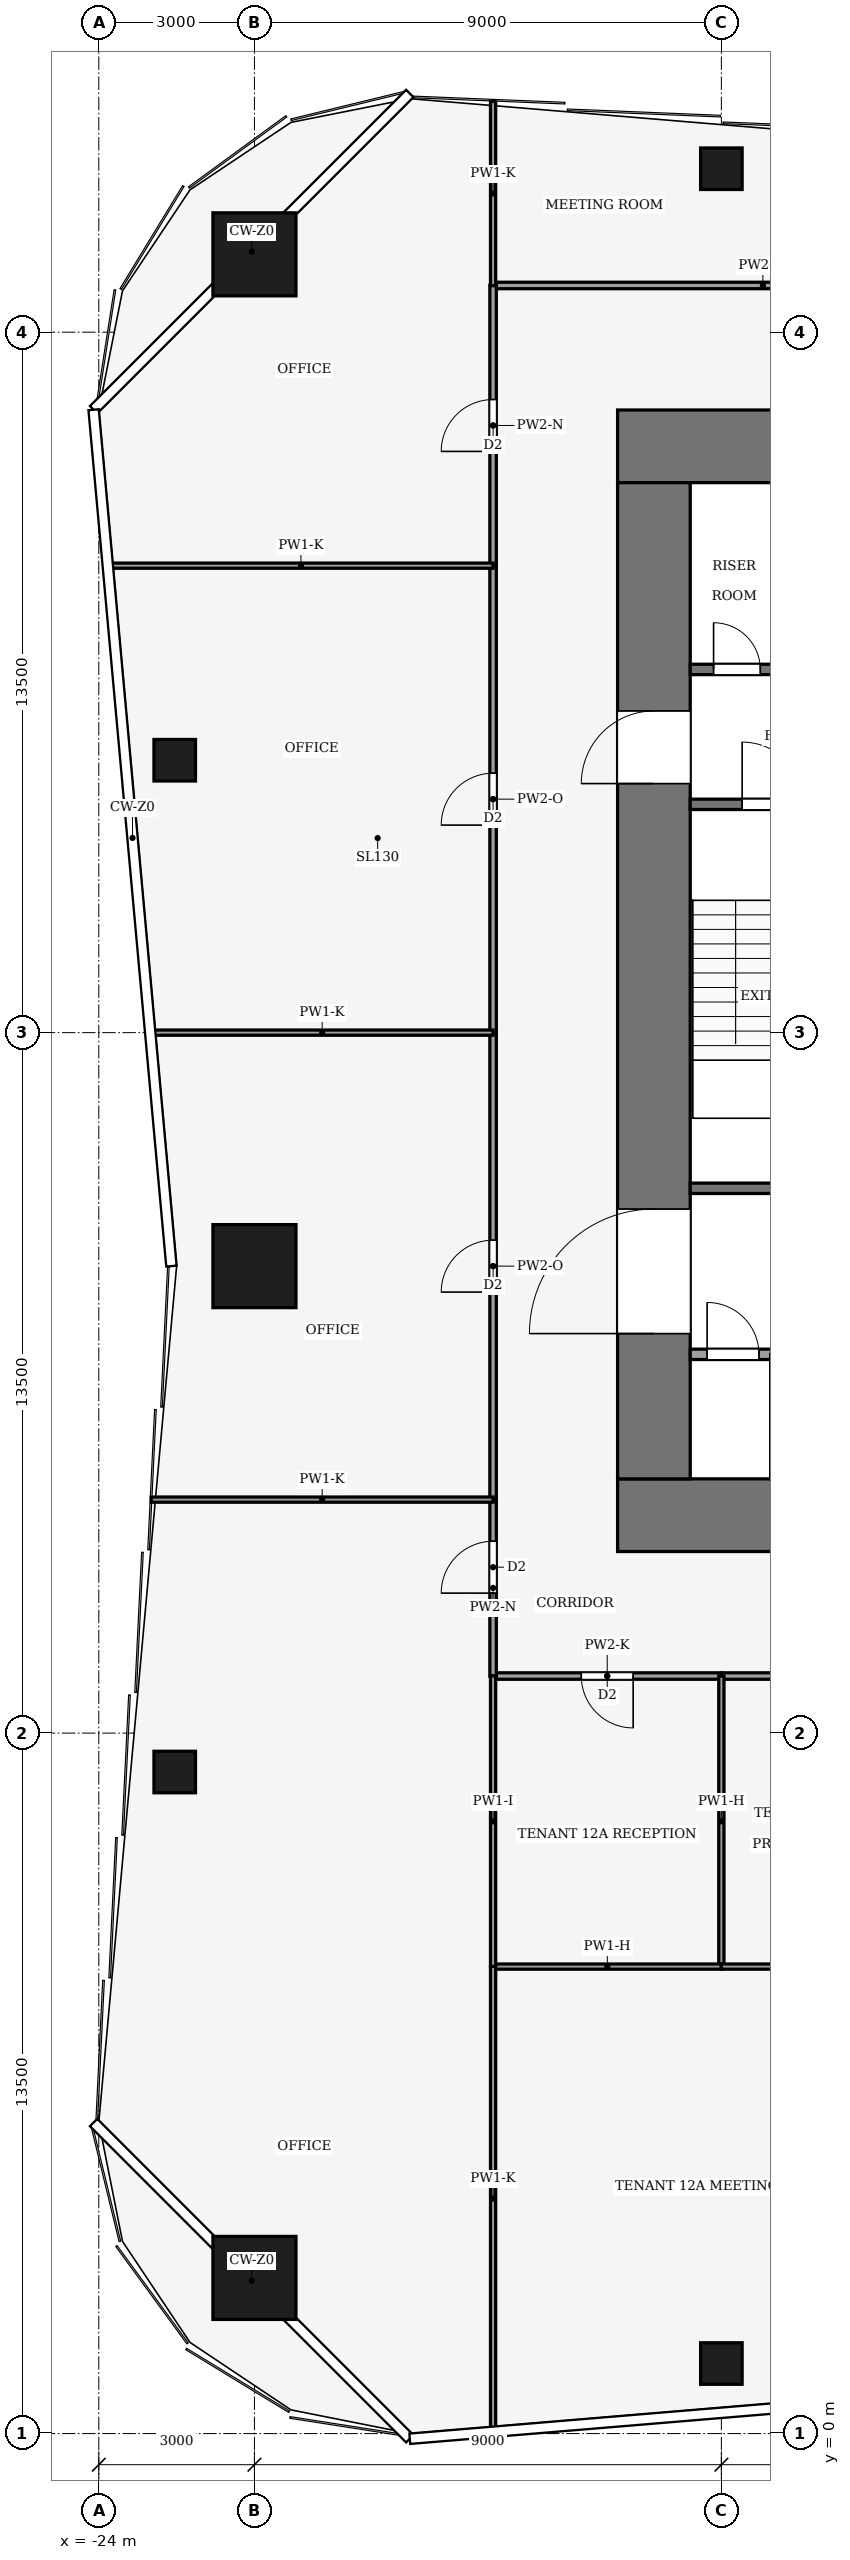
"""IFC4 building model, lengths in metres.
Left out: names, types, materials, properties, quantities, classifications, styles, units other than length and angle.
Written with IfcOpenShell. Run it as: python <this file> out.ifc"""

import sys

from ifc_helpers import new_model, si_unit, direction, frame, frame_2d, origin, origin_2d, place, context, subcontext, project, spatial, rectangle, hollow_rectangle, extrude, element, fill, save


model = new_model("IFC4")
c1 = context("Model", 3, precision=1e-05, world=origin(), true_north=direction((0.0, 1.0)))
c2 = subcontext(c1, "Body", "Model", "MODEL_VIEW")
j1 = project(units=[si_unit("LENGTHUNIT", "METRE"), si_unit("PLANEANGLEUNIT", "RADIAN")], contexts=[c1])
p1 = place(None, origin())
s1 = spatial("IfcSite", under=j1, at=p1, CompositionType="ELEMENT")
p2 = place(p1, origin())
s2 = spatial("IfcBuilding", under=s1, at=p2, CompositionType="ELEMENT")
p3 = place(p2, frame((0.0, 0.0, 54.0)))
s3 = spatial("IfcBuildingStorey", under=s2, at=p3, CompositionType="ELEMENT", Elevation=54.0)
for number, where, z_axis, x_axis in (
    (1, (-14.0, 17.7, -0.13), (0.0, 0.0, 1.0), (1.0, 0.0, 0.0)),
    (2, (-14.0, 38.3, -0.13), (0.0, 0.0, 1.0), (1.0, 0.0, 0.0)),
):
    element("IfcWall", number, at=place(p3, frame(where, z_axis=z_axis, x_axis=x_axis)), inside=s3, PredefinedType="SHEAR", context=c2, shape_type="SweptSolid", body=[
        extrude(rectangle(XDim=28.0, YDim=1.4, at=frame_2d((14.0, 0.0))), origin(), (0.0, 0.0, 1.0), 3.88),
    ])
p4 = place(p3, frame((-13.3, 18.4, -0.13), z_axis=(0.0, 0.0, 1.0), x_axis=(0.0, 1.0, 0.0)))
e3 = element("IfcWall", 3, at=p4, inside=s3, PredefinedType="SHEAR", context=c2, shape_type="SweptSolid", body=[
    extrude(rectangle(XDim=19.2, YDim=1.4, at=frame_2d((9.6, 0.0))), origin(), (0.0, 0.0, 1.0), 3.88),
])
p5 = place(p4, frame((2.8, 0.0, 0.13)))
e4 = element("IfcOpeningElement", 4, at=p5, cuts=e3, PredefinedType="OPENING", context=c2, shape_type="SweptSolid", body=[
    extrude(rectangle(XDim=2.4, YDim=2.4, at=frame_2d((1.2, 1.2))), frame((0.0, 0.71, 0.0), z_axis=(0.0, -1.0, 0.0), x_axis=(1.0, 0.0, 0.0)), (0.0, 0.0, 1.0), 1.42),
])
p6 = place(p4, frame((13.4, 0.0, 0.13)))
e5 = element("IfcOpeningElement", 5, at=p6, cuts=e3, PredefinedType="OPENING", context=c2, shape_type="SweptSolid", body=[
    extrude(rectangle(XDim=1.4, YDim=2.2, at=frame_2d((0.7, 1.1))), frame((0.0, 0.71, 0.0), z_axis=(0.0, -1.0, 0.0), x_axis=(1.0, 0.0, 0.0)), (0.0, 0.0, 1.0), 1.42),
])
for number, where, z_axis, x_axis in (
    (6, (-21.0, 42.0, 0.0), (0.0, 0.0, 1.0), (1.0, 0.0, 0.0)),
    (7, (-21.0, 3.0, 0.0), (0.0, 0.0, 1.0), (1.0, 0.0, 0.0)),
    (8, (-21.0, 22.5, 0.0), (0.0, 0.0, 1.0), (1.0, 0.0, 0.0)),
):
    element("IfcColumn", number, at=place(p3, frame(where, z_axis=z_axis, x_axis=x_axis)), inside=s3, PredefinedType="COLUMN", context=c2, shape_type="SweptSolid", body=[
        extrude(hollow_rectangle(XDim=1.6, YDim=1.6, WallThickness=0.09, at=origin_2d()), origin(), (0.0, 0.0, 1.0), 4.0),
    ])
for number, where, z_axis, x_axis in (
    (9, (-12.0, 43.65, 0.0), (0.0, 0.0, 1.0), (1.0, 0.0, 0.0)),
    (10, (-12.0, 1.35, 0.0), (0.0, 0.0, 1.0), (1.0, 0.0, 0.0)),
    (11, (-22.536, 12.75, 0.0), (0.0, 0.0, 1.0), (1.0, 0.0, 0.0)),
    (12, (-22.536, 32.25, 0.0), (0.0, 0.0, 1.0), (1.0, 0.0, 0.0)),
):
    element("IfcColumn", number, at=place(p3, frame(where, z_axis=z_axis, x_axis=x_axis)), inside=s3, PredefinedType="COLUMN", context=c2, shape_type="SweptSolid", body=[
        extrude(hollow_rectangle(XDim=0.8, YDim=0.8, WallThickness=0.04, at=origin_2d()), origin(), (0.0, 0.0, 1.0), 4.0),
    ])
p7 = place(p3, frame((-12.6, 20.8, 0.0), z_axis=(0.0, 0.0, 1.0), x_axis=(1.0, 0.0, 0.0)))
e13 = element("IfcWall", 13, at=p7, inside=s3, PredefinedType="PARTITIONING", context=c2, shape_type="SweptSolid", body=[
    extrude(rectangle(XDim=6.6, YDim=0.2, at=frame_2d((3.3, 0.0))), origin(), (0.0, 0.0, 1.0), 3.75),
])
p8 = place(p7, frame((0.325, 0.0, 0.0)))
e14 = element("IfcOpeningElement", 14, at=p8, cuts=e13, PredefinedType="OPENING", context=c2, shape_type="SweptSolid", body=[
    extrude(rectangle(XDim=1.0, YDim=2.1, at=frame_2d((0.5, 1.05))), frame((0.0, 0.11, 0.0), z_axis=(0.0, -1.0, 0.0), x_axis=(1.0, 0.0, 0.0)), (0.0, 0.0, 1.0), 0.22),
])
p9 = place(p7, frame((2.8, 0.0, 0.0)))
e15 = element("IfcOpeningElement", 15, at=p9, cuts=e13, PredefinedType="OPENING", context=c2, shape_type="SweptSolid", body=[
    extrude(rectangle(XDim=1.0, YDim=2.1, at=frame_2d((0.5, 1.05))), frame((0.0, 0.11, 0.0), z_axis=(0.0, -1.0, 0.0), x_axis=(1.0, 0.0, 0.0)), (0.0, 0.0, 1.0), 0.22),
])
p10 = place(p7, frame((5.275, 0.0, 0.0)))
e16 = element("IfcOpeningElement", 16, at=p10, cuts=e13, PredefinedType="OPENING", context=c2, shape_type="SweptSolid", body=[
    extrude(rectangle(XDim=1.0, YDim=2.1, at=frame_2d((0.5, 1.05))), frame((0.0, 0.11, 0.0), z_axis=(0.0, -1.0, 0.0), x_axis=(1.0, 0.0, 0.0)), (0.0, 0.0, 1.0), 0.22),
])
p11 = place(p3, frame((-12.6, 24.0, 0.0), z_axis=(0.0, 0.0, 1.0), x_axis=(1.0, 0.0, 0.0)))
e17 = element("IfcWall", 17, at=p11, inside=s3, PredefinedType="PARTITIONING", context=c2, shape_type="SweptSolid", body=[
    extrude(rectangle(XDim=6.6, YDim=0.2, at=frame_2d((3.3, 0.0))), origin(), (0.0, 0.0, 1.0), 3.75),
])
p12 = place(p11, frame((4.03, 0.0, 0.0)))
e18 = element("IfcOpeningElement", 18, at=p12, cuts=e17, PredefinedType="OPENING", context=c2, shape_type="SweptSolid", body=[
    extrude(rectangle(XDim=0.8, YDim=2.1, at=frame_2d((0.4, 1.05))), frame((0.0, 0.11, 0.0), z_axis=(0.0, -1.0, 0.0), x_axis=(1.0, 0.0, 0.0)), (0.0, 0.0, 1.0), 0.22),
])
p13 = place(p11, frame((5.33, 0.0, 0.0)))
e19 = element("IfcOpeningElement", 19, at=p13, cuts=e17, PredefinedType="OPENING", context=c2, shape_type="SweptSolid", body=[
    extrude(rectangle(XDim=1.0, YDim=2.1, at=frame_2d((0.5, 1.05))), frame((0.0, 0.11, 0.0), z_axis=(0.0, -1.0, 0.0), x_axis=(1.0, 0.0, 0.0)), (0.0, 0.0, 1.0), 0.22),
])
p14 = place(p3, frame((-12.6, 31.4, 0.0), z_axis=(0.0, 0.0, 1.0), x_axis=(1.0, 0.0, 0.0)))
e20 = element("IfcWall", 20, at=p14, inside=s3, PredefinedType="PARTITIONING", context=c2, shape_type="SweptSolid", body=[
    extrude(rectangle(XDim=6.6, YDim=0.2, at=frame_2d((3.3, 0.0))), origin(), (0.0, 0.0, 1.0), 3.75),
])
p15 = place(p14, frame((1.0, 0.0, 0.0)))
e21 = element("IfcOpeningElement", 21, at=p15, cuts=e20, PredefinedType="OPENING", context=c2, shape_type="SweptSolid", body=[
    extrude(rectangle(XDim=1.2, YDim=2.2, at=frame_2d((0.6, 1.1))), frame((0.0, 0.11, 0.0), z_axis=(0.0, -1.0, 0.0), x_axis=(1.0, 0.0, 0.0)), (0.0, 0.0, 1.0), 0.22),
])
p16 = place(p3, frame((-12.6, 34.0, 0.0), z_axis=(0.0, 0.0, 1.0), x_axis=(1.0, 0.0, 0.0)))
e22 = element("IfcWall", 22, at=p16, inside=s3, PredefinedType="PARTITIONING", context=c2, shape_type="SweptSolid", body=[
    extrude(rectangle(XDim=6.6, YDim=0.2, at=frame_2d((3.3, 0.0))), origin(), (0.0, 0.0, 1.0), 3.75),
])
p17 = place(p16, frame((4.7, 0.0, 0.0)))
e23 = element("IfcOpeningElement", 23, at=p17, cuts=e22, PredefinedType="OPENING", context=c2, shape_type="SweptSolid", body=[
    extrude(rectangle(XDim=1.4, YDim=2.2, at=frame_2d((0.7, 1.1))), frame((0.0, 0.11, 0.0), z_axis=(0.0, -1.0, 0.0), x_axis=(1.0, 0.0, 0.0)), (0.0, 0.0, 1.0), 0.22),
])
p18 = place(p16, frame((2.3, 0.0, 0.0)))
e24 = element("IfcOpeningElement", 24, at=p18, cuts=e22, PredefinedType="OPENING", context=c2, shape_type="SweptSolid", body=[
    extrude(rectangle(XDim=1.4, YDim=2.2, at=frame_2d((0.7, 1.1))), frame((0.0, 0.11, 0.0), z_axis=(0.0, -1.0, 0.0), x_axis=(1.0, 0.0, 0.0)), (0.0, 0.0, 1.0), 0.22),
])
p19 = place(p16, frame((0.45, 0.0, 0.0)))
e25 = element("IfcOpeningElement", 25, at=p19, cuts=e22, PredefinedType="OPENING", context=c2, shape_type="SweptSolid", body=[
    extrude(rectangle(XDim=0.9, YDim=2.1, at=frame_2d((0.45, 1.05))), frame((0.0, 0.11, 0.0), z_axis=(0.0, -1.0, 0.0), x_axis=(1.0, 0.0, 0.0)), (0.0, 0.0, 1.0), 0.22),
])
p20 = place(p3, frame((-12.0, 14.6, 0.0), z_axis=(0.0, 0.0, 1.0), x_axis=(-1.0, 0.0, 0.0)))
e26 = element("IfcWall", 26, at=p20, inside=s3, PredefinedType="PARTITIONING", context=c2, shape_type="SweptSolid", body=[
    extrude(rectangle(XDim=4.4, YDim=0.125, at=frame_2d((2.2, 0.0))), origin(), (0.0, 0.0, 1.0), 3.17),
])
p21 = place(p20, frame((1.7, 0.0, 0.0)))
e27 = element("IfcOpeningElement", 27, at=p21, cuts=e26, PredefinedType="OPENING", context=c2, shape_type="SweptSolid", body=[
    extrude(rectangle(XDim=1.0, YDim=2.1, at=frame_2d((0.5, 1.05))), frame((0.0, 0.073, 0.0), z_axis=(0.0, -1.0, 0.0), x_axis=(1.0, 0.0, 0.0)), (0.0, 0.0, 1.0), 0.145),
])
p22 = place(p3, frame((-12.0, 14.6, 0.0), z_axis=(0.0, 0.0, 1.0), x_axis=(1.0, 0.0, 0.0)))
e28 = element("IfcWall", 28, at=p22, inside=s3, PredefinedType="PARTITIONING", context=c2, shape_type="SweptSolid", body=[
    extrude(rectangle(XDim=3.0, YDim=0.125, at=frame_2d((1.5, 0.0))), origin(), (0.0, 0.0, 1.0), 3.17),
])
p23 = place(p3, frame((-16.4, 41.4, 0.0), z_axis=(0.0, 0.0, 1.0), x_axis=(1.0, 0.0, 0.0)))
e29 = element("IfcWall", 29, at=p23, inside=s3, PredefinedType="PARTITIONING", context=c2, shape_type="SweptSolid", body=[
    extrude(rectangle(XDim=10.4, YDim=0.125, at=frame_2d((5.2, 0.0))), origin(), (0.0, 0.0, 1.0), 3.42),
])
p24 = place(p23, frame((7.5, 0.0, 0.0)))
e30 = element("IfcOpeningElement", 30, at=p24, cuts=e29, PredefinedType="OPENING", context=c2, shape_type="SweptSolid", body=[
    extrude(rectangle(XDim=1.0, YDim=2.1, at=frame_2d((0.5, 1.05))), frame((0.0, 0.073, 0.0), z_axis=(0.0, -1.0, 0.0), x_axis=(1.0, 0.0, 0.0)), (0.0, 0.0, 1.0), 0.145),
])
p25 = place(p3, frame((-16.4, 14.596, 0.0), z_axis=(0.0, 0.0, 1.0), x_axis=(0.0, 1.0, 0.0)))
e31 = element("IfcWall", 31, at=p25, inside=s3, PredefinedType="PARTITIONING", context=c2, shape_type="SweptSolid", body=[
    extrude(rectangle(XDim=3.404, YDim=0.125, at=frame_2d((1.702, 0.0))), origin(), (0.0, 0.0, 1.0), 3.02),
])
p26 = place(p25, frame((1.602, 0.0, 0.0)))
e32 = element("IfcOpeningElement", 32, at=p26, cuts=e31, PredefinedType="OPENING", context=c2, shape_type="SweptSolid", body=[
    extrude(rectangle(XDim=1.0, YDim=2.1, at=frame_2d((0.5, 1.05))), frame((0.0, 0.073, 0.0), z_axis=(0.0, -1.0, 0.0), x_axis=(1.0, 0.0, 0.0)), (0.0, 0.0, 1.0), 0.145),
])
p27 = place(p3, frame((-16.4, 18.0, 0.0), z_axis=(0.0, 0.0, 1.0), x_axis=(0.0, 1.0, 0.0)))
e33 = element("IfcWall", 33, at=p27, inside=s3, PredefinedType="PARTITIONING", context=c2, shape_type="SweptSolid", body=[
    extrude(rectangle(XDim=9.0, YDim=0.125, at=frame_2d((4.5, 0.0))), origin(), (0.0, 0.0, 1.0), 3.36),
])
p28 = place(p27, frame((4.0, 0.0, 0.0)))
e34 = element("IfcOpeningElement", 34, at=p28, cuts=e33, PredefinedType="OPENING", context=c2, shape_type="SweptSolid", body=[
    extrude(rectangle(XDim=1.0, YDim=2.1, at=frame_2d((0.5, 1.05))), frame((0.0, 0.073, 0.0), z_axis=(0.0, -1.0, 0.0), x_axis=(1.0, 0.0, 0.0)), (0.0, 0.0, 1.0), 0.145),
])
p29 = place(p3, frame((-16.4, 27.0, 0.0), z_axis=(0.0, 0.0, 1.0), x_axis=(0.0, 1.0, 0.0)))
e35 = element("IfcWall", 35, at=p29, inside=s3, PredefinedType="PARTITIONING", context=c2, shape_type="SweptSolid", body=[
    extrude(rectangle(XDim=9.0, YDim=0.125, at=frame_2d((4.5, 0.0))), origin(), (0.0, 0.0, 1.0), 3.36),
])
p30 = place(p29, frame((4.0, 0.0, 0.0)))
e36 = element("IfcOpeningElement", 36, at=p30, cuts=e35, PredefinedType="OPENING", context=c2, shape_type="SweptSolid", body=[
    extrude(rectangle(XDim=1.0, YDim=2.1, at=frame_2d((0.5, 1.05))), frame((0.0, 0.073, 0.0), z_axis=(0.0, -1.0, 0.0), x_axis=(1.0, 0.0, 0.0)), (0.0, 0.0, 1.0), 0.145),
])
p31 = place(p3, frame((-16.4, 36.0, 0.0), z_axis=(0.0, 0.0, 1.0), x_axis=(0.0, 1.0, 0.0)))
e37 = element("IfcWall", 37, at=p31, inside=s3, PredefinedType="PARTITIONING", context=c2, shape_type="SweptSolid", body=[
    extrude(rectangle(XDim=5.404, YDim=0.125, at=frame_2d((2.702, 0.0))), origin(), (0.0, 0.0, 1.0), 3.02),
])
p32 = place(p31, frame((2.202, 0.0, 0.0)))
e38 = element("IfcOpeningElement", 38, at=p32, cuts=e37, PredefinedType="OPENING", context=c2, shape_type="SweptSolid", body=[
    extrude(rectangle(XDim=1.0, YDim=2.1, at=frame_2d((0.5, 1.05))), frame((0.0, 0.073, 0.0), z_axis=(0.0, -1.0, 0.0), x_axis=(1.0, 0.0, 0.0)), (0.0, 0.0, 1.0), 0.145),
])
p33 = place(p3, frame((-12.0, 9.0, 0.0), z_axis=(0.0, 0.0, 1.0), x_axis=(0.0, 1.0, 0.0)))
e39 = element("IfcWall", 39, at=p33, inside=s3, PredefinedType="PARTITIONING", context=c2, shape_type="SweptSolid", body=[
    extrude(rectangle(XDim=5.6, YDim=0.1, at=frame_2d((2.8, 0.0))), origin(), (0.0, 0.0, 1.0), 3.17),
])
p34 = place(p3, frame((-16.4, 9.0, 0.0), z_axis=(0.0, 0.0, 1.0), x_axis=(1.0, 0.0, 0.0)))
e40 = element("IfcWall", 40, at=p34, inside=s3, PredefinedType="PARTITIONING", context=c2, shape_type="SweptSolid", body=[
    extrude(rectangle(XDim=4.404, YDim=0.1, at=frame_2d((2.202, 0.0))), origin(), (0.0, 0.0, 1.0), 3.17),
])
p35 = place(p3, frame((-16.4, 14.604, 0.0), z_axis=(0.0, 0.0, 1.0), x_axis=(0.0, -1.0, 0.0)))
e41 = element("IfcWall", 41, at=p35, inside=s3, PredefinedType="PARTITIONING", context=c2, shape_type="SweptSolid", body=[
    extrude(rectangle(XDim=5.608, YDim=0.1, at=frame_2d((2.804, 0.0))), origin(), (0.0, 0.0, 1.0), 3.75),
])
p36 = place(p3, frame((-12.004, 9.0, 0.0), z_axis=(0.0, 0.0, 1.0), x_axis=(1.0, 0.0, 0.0)))
e42 = element("IfcWall", 42, at=p36, inside=s3, PredefinedType="PARTITIONING", context=c2, shape_type="SweptSolid", body=[
    extrude(rectangle(XDim=3.008, YDim=0.1, at=frame_2d((1.504, 0.0))), origin(), (0.0, 0.0, 1.0), 3.75),
])
p37 = place(p3, frame((-16.4, 9.004, 0.0), z_axis=(0.0, 0.0, 1.0), x_axis=(0.0, -1.0, 0.0)))
e43 = element("IfcWall", 43, at=p37, inside=s3, PredefinedType="PARTITIONING", context=c2, shape_type="SweptSolid", body=[
    extrude(rectangle(XDim=8.951, YDim=0.1, at=frame_2d((4.475, 0.0))), origin(), (0.0, 0.0, 1.0), 2.92),
])
p38 = place(p3, frame((-16.4, 44.947, 0.0), z_axis=(0.0, 0.0, 1.0), x_axis=(0.0, -1.0, 0.0)))
e44 = element("IfcWall", 44, at=p38, inside=s3, PredefinedType="PARTITIONING", context=c2, shape_type="SweptSolid", body=[
    extrude(rectangle(XDim=3.551, YDim=0.1, at=frame_2d((1.775, 0.0))), origin(), (0.0, 0.0, 1.0), 2.92),
])
for number, where, z_axis, x_axis in (
    (45, (-16.4, 18.0, 0.0), (0.0, 0.0, 1.0), (-1.0, 0.0, 0.0)),
    (46, (-16.4, 27.0, 0.0), (0.0, 0.0, 1.0), (-1.0, 0.0, 0.0)),
):
    element("IfcWall", number, at=place(p3, frame(where, z_axis=z_axis, x_axis=x_axis)), inside=s3, PredefinedType="PARTITIONING", context=c2, shape_type="SweptSolid", body=[
        extrude(rectangle(XDim=6.589, YDim=0.1, at=frame_2d((3.294, 0.0))), origin(), (0.0, 0.0, 1.0), 2.92),
    ])
p39 = place(p3, frame((-16.4, 36.0, 0.0), z_axis=(0.0, 0.0, 1.0), x_axis=(-1.0, 0.0, 0.0)))
e47 = element("IfcWall", 47, at=p39, inside=s3, PredefinedType="PARTITIONING", context=c2, shape_type="SweptSolid", body=[
    extrude(rectangle(XDim=7.407, YDim=0.1, at=frame_2d((3.704, 0.0))), origin(), (0.0, 0.0, 1.0), 2.92),
])
p40 = place(p19, origin())
e48 = element("IfcDoor", 48, at=p40, inside=s3, OperationType="SINGLE_SWING_RIGHT", PredefinedType="DOOR", context=c2, shape_type="SweptSolid", body=[
    extrude(rectangle(XDim=0.9, YDim=2.1, at=frame_2d((0.45, 1.05))), frame((0.0, 0.025, 0.0), z_axis=(0.0, -1.0, 0.0), x_axis=(1.0, 0.0, 0.0)), (0.0, 0.0, 1.0), 0.05),
])
fill(e25, e48)
p41 = place(p8, origin())
e49 = element("IfcDoor", 49, at=p41, inside=s3, OperationType="SINGLE_SWING_RIGHT", PredefinedType="DOOR", context=c2, shape_type="SweptSolid", body=[
    extrude(rectangle(XDim=1.0, YDim=2.1, at=frame_2d((0.5, 1.05))), frame((0.0, 0.025, 0.0), z_axis=(0.0, -1.0, 0.0), x_axis=(1.0, 0.0, 0.0)), (0.0, 0.0, 1.0), 0.05),
])
fill(e14, e49)
p42 = place(p15, origin())
e50 = element("IfcDoor", 50, at=p42, inside=s3, OperationType="SINGLE_SWING_LEFT", PredefinedType="DOOR", context=c2, shape_type="SweptSolid", body=[
    extrude(rectangle(XDim=1.2, YDim=2.2, at=frame_2d((0.6, 1.1))), frame((0.0, 0.025, 0.0), z_axis=(0.0, -1.0, 0.0), x_axis=(1.0, 0.0, 0.0)), (0.0, 0.0, 1.0), 0.05),
])
fill(e21, e50)
p43 = place(p5, origin())
e51 = element("IfcDoor", 51, at=p43, inside=s3, OperationType="DOUBLE_DOOR_SINGLE_SWING", PredefinedType="DOOR", context=c2, shape_type="SweptSolid", body=[
    extrude(rectangle(XDim=2.4, YDim=2.4, at=frame_2d((1.2, 1.2))), frame((0.0, 0.025, 0.0), z_axis=(0.0, -1.0, 0.0), x_axis=(1.0, 0.0, 0.0)), (0.0, 0.0, 1.0), 0.05),
])
fill(e4, e51)
p44 = place(p6, origin())
e52 = element("IfcDoor", 52, at=p44, inside=s3, OperationType="SINGLE_SWING_LEFT", PredefinedType="DOOR", context=c2, shape_type="SweptSolid", body=[
    extrude(rectangle(XDim=1.4, YDim=2.2, at=frame_2d((0.7, 1.1))), frame((0.0, 0.025, 0.0), z_axis=(0.0, -1.0, 0.0), x_axis=(1.0, 0.0, 0.0)), (0.0, 0.0, 1.0), 0.05),
])
fill(e5, e52)
p45 = place(p21, origin())
e53 = element("IfcDoor", 53, at=p45, inside=s3, OperationType="SINGLE_SWING_LEFT", PredefinedType="DOOR", context=c2, shape_type="SweptSolid", body=[
    extrude(rectangle(XDim=1.0, YDim=2.1, at=frame_2d((0.5, 1.05))), frame((0.0, 0.025, 0.0), z_axis=(0.0, -1.0, 0.0), x_axis=(1.0, 0.0, 0.0)), (0.0, 0.0, 1.0), 0.05),
])
fill(e27, e53)
p46 = place(p26, origin())
e54 = element("IfcDoor", 54, at=p46, inside=s3, OperationType="SINGLE_SWING_RIGHT", PredefinedType="DOOR", context=c2, shape_type="SweptSolid", body=[
    extrude(rectangle(XDim=1.0, YDim=2.1, at=frame_2d((0.5, 1.05))), frame((0.0, 0.025, 0.0), z_axis=(0.0, -1.0, 0.0), x_axis=(1.0, 0.0, 0.0)), (0.0, 0.0, 1.0), 0.05),
])
fill(e32, e54)
p47 = place(p28, origin())
e55 = element("IfcDoor", 55, at=p47, inside=s3, OperationType="SINGLE_SWING_RIGHT", PredefinedType="DOOR", context=c2, shape_type="SweptSolid", body=[
    extrude(rectangle(XDim=1.0, YDim=2.1, at=frame_2d((0.5, 1.05))), frame((0.0, 0.025, 0.0), z_axis=(0.0, -1.0, 0.0), x_axis=(1.0, 0.0, 0.0)), (0.0, 0.0, 1.0), 0.05),
])
fill(e34, e55)
p48 = place(p30, origin())
e56 = element("IfcDoor", 56, at=p48, inside=s3, OperationType="SINGLE_SWING_LEFT", PredefinedType="DOOR", context=c2, shape_type="SweptSolid", body=[
    extrude(rectangle(XDim=1.0, YDim=2.1, at=frame_2d((0.5, 1.05))), frame((0.0, 0.025, 0.0), z_axis=(0.0, -1.0, 0.0), x_axis=(1.0, 0.0, 0.0)), (0.0, 0.0, 1.0), 0.05),
])
fill(e36, e56)
p49 = place(p32, origin())
e57 = element("IfcDoor", 57, at=p49, inside=s3, OperationType="SINGLE_SWING_RIGHT", PredefinedType="DOOR", context=c2, shape_type="SweptSolid", body=[
    extrude(rectangle(XDim=1.0, YDim=2.1, at=frame_2d((0.5, 1.05))), frame((0.0, 0.025, 0.0), z_axis=(0.0, -1.0, 0.0), x_axis=(1.0, 0.0, 0.0)), (0.0, 0.0, 1.0), 0.05),
])
fill(e38, e57)
save(model, sys.argv[1])
